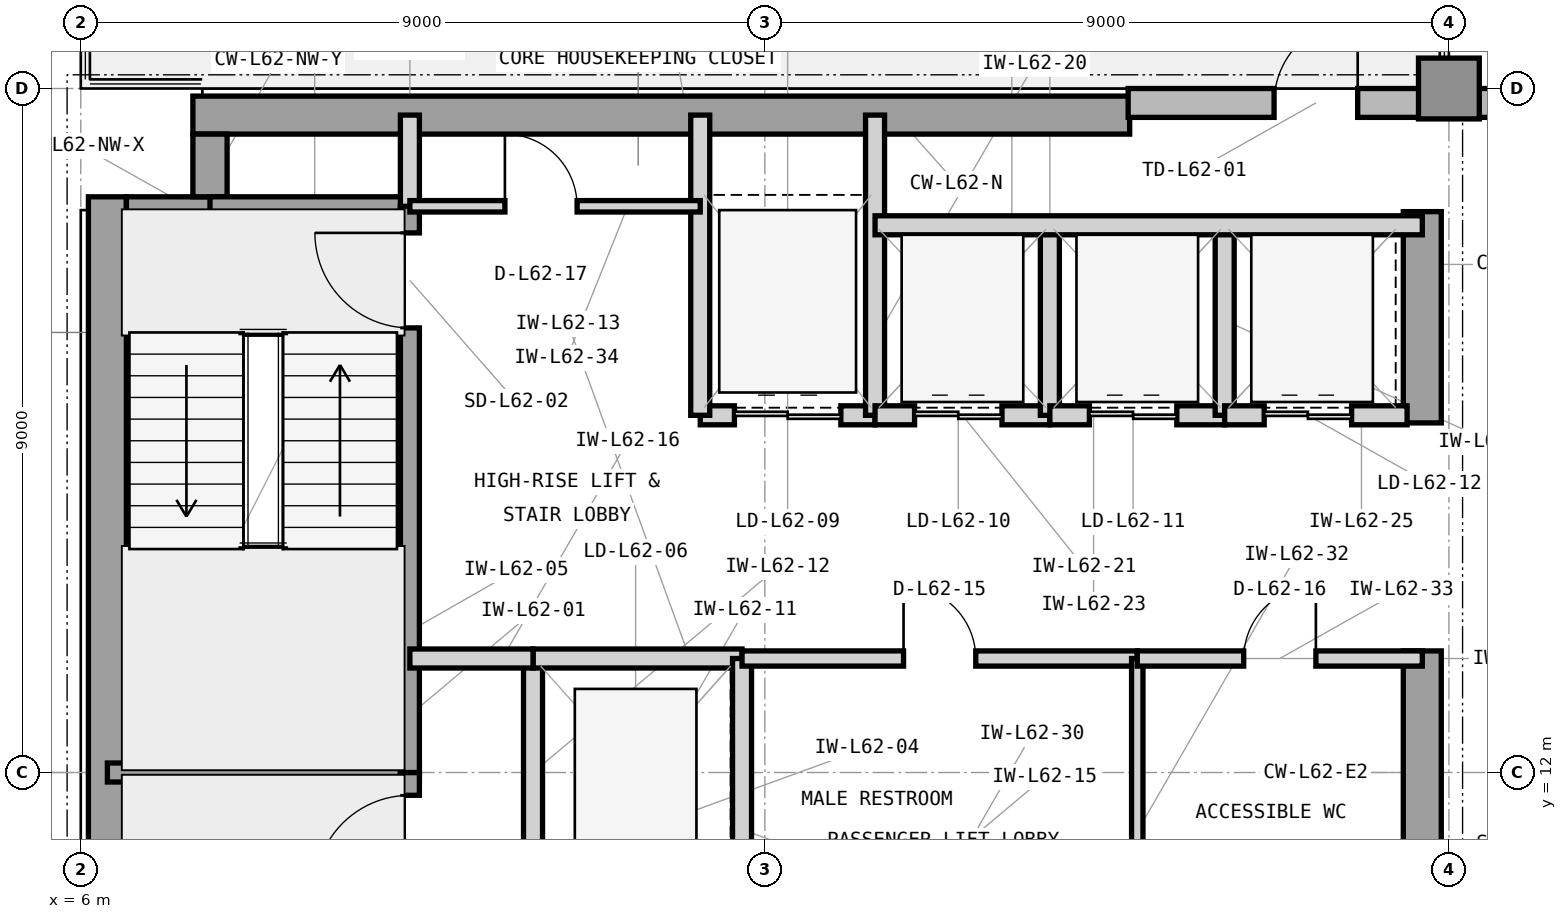
"""IFC4 building model, lengths in metres.
Left out: names, types, materials, properties, quantities, classifications, styles, units other than length and angle.
Written with IfcOpenShell. Run it as: python <this file> out.ifc"""

import sys

from ifc_helpers import new_model, si_unit, direction, frame, frame_2d, origin, origin_2d, place, context, subcontext, project, spatial, rectangle, extrude, element, fill, save


model = new_model("IFC4")
c1 = context("Model", 3, precision=1e-05, world=origin(), true_north=direction((0.0, 1.0)))
c2 = subcontext(c1, "Body", "Model", "MODEL_VIEW")
j1 = project(units=[si_unit("LENGTHUNIT", "METRE"), si_unit("PLANEANGLEUNIT", "RADIAN")], contexts=[c1])
p1 = place(None, origin())
s1 = spatial("IfcSite", under=j1, at=p1, CompositionType="ELEMENT")
p2 = place(p1, origin())
s2 = spatial("IfcBuilding", under=s1, at=p2, CompositionType="ELEMENT")
p3 = place(p2, frame((0.0, 0.0, 254.7)))
s3 = spatial("IfcBuildingStorey", under=s2, at=p3, CompositionType="ELEMENT", Elevation=254.7)
p4 = place(p3, frame((6.35, 4.425, 0.0), z_axis=(0.0, 0.0, 1.0), x_axis=(0.0, 1.0, 0.0)))
e1 = element("IfcWall", 1, at=p4, inside=s3, PredefinedType="SHEAR", context=c2, shape_type="SweptSolid", body=[
    extrude(rectangle(XDim=15.15, YDim=0.5, at=frame_2d((7.575, 0.0))), origin(), (0.0, 0.0, 1.0), 3.9),
])
p5 = place(p3, frame((7.475, 20.65, 0.0), z_axis=(0.0, 0.0, 1.0), x_axis=(1.0, 0.0, 0.0)))
e2 = element("IfcWall", 2, at=p5, inside=s3, PredefinedType="SHEAR", context=c2, shape_type="SweptSolid", body=[
    extrude(rectangle(XDim=12.325, YDim=0.5, at=frame_2d((6.163, 0.0))), origin(), (0.0, 0.0, 1.0), 3.9),
])
p6 = place(p3, frame((23.65, 10.4, 0.0), z_axis=(0.0, 0.0, 1.0), x_axis=(0.0, 1.0, 0.0)))
e3 = element("IfcWall", 3, at=p6, inside=s3, PredefinedType="SHEAR", context=c2, shape_type="SweptSolid", body=[
    extrude(rectangle(XDim=3.2, YDim=0.5, at=frame_2d((1.6, 0.0))), origin(), (0.0, 0.0, 1.0), 3.9),
])
p7 = place(p3, frame((23.65, 16.6, 0.0), z_axis=(0.0, 0.0, 1.0), x_axis=(0.0, 1.0, 0.0)))
e4 = element("IfcWall", 4, at=p7, inside=s3, PredefinedType="SHEAR", context=c2, shape_type="SweptSolid", body=[
    extrude(rectangle(XDim=2.78, YDim=0.5, at=frame_2d((1.39, 0.0))), origin(), (0.0, 0.0, 1.0), 3.9),
])
p8 = place(p3, frame((6.6, 19.35, 0.0), z_axis=(0.0, 0.0, 1.0), x_axis=(1.0, 0.0, 0.0)))
e5 = element("IfcWall", 5, at=p8, inside=s3, PredefinedType="SHEAR", context=c2, shape_type="SweptSolid", body=[
    extrude(rectangle(XDim=1.325, YDim=0.45, at=frame_2d((0.663, 0.0))), origin(), (0.0, 0.0, 1.0), 3.9),
])
p9 = place(p3, frame((7.7, 19.575, 0.0), z_axis=(0.0, 0.0, 1.0), x_axis=(0.0, 1.0, 0.0)))
e6 = element("IfcWall", 6, at=p9, inside=s3, PredefinedType="SHEAR", context=c2, shape_type="SweptSolid", body=[
    extrude(rectangle(XDim=0.825, YDim=0.45, at=frame_2d((0.413, 0.0))), origin(), (0.0, 0.0, 1.0), 3.9),
])
p10 = place(p3, frame((24.0, 21.0, 0.0), z_axis=(0.0, 0.0, 1.0), x_axis=(1.0, 0.0, 0.0)))
e7 = element("IfcColumn", 7, at=p10, inside=s3, PredefinedType="COLUMN", context=c2, shape_type="SweptSolid", body=[
    extrude(rectangle(XDim=0.8, YDim=0.8, at=origin_2d()), origin(), (0.0, 0.0, 1.0), 3.9),
])
p11 = place(p3, frame((52.4, 20.81, 0.0), z_axis=(0.0, 0.0, 1.0), x_axis=(-1.0, 0.0, 0.0)))
e8 = element("IfcWall", 8, at=p11, inside=s3, PredefinedType="STANDARD", context=c2, shape_type="SweptSolid", body=[
    extrude(rectangle(XDim=32.62, YDim=0.38, at=frame_2d((16.31, 0.0))), origin(), (0.0, 0.0, 1.0), 3.715),
])
p12 = place(p11, frame((29.6, 0.0, 0.0)))
e9 = element("IfcOpeningElement", 9, at=p12, cuts=e8, PredefinedType="OPENING", context=c2, shape_type="SweptSolid", body=[
    extrude(rectangle(XDim=1.1, YDim=2.3, at=frame_2d((0.55, 1.15))), frame((0.0, 0.2, 0.0), z_axis=(0.0, -1.0, 0.0), x_axis=(1.0, 0.0, 0.0)), (0.0, 0.0, 1.0), 0.4),
])
p13 = place(p11, frame((20.354, 0.0, 0.8)))
e10 = element("IfcOpeningElement", 10, at=p13, cuts=e8, PredefinedType="OPENING", context=c2, shape_type="SweptSolid", body=[
    extrude(rectangle(XDim=2.6, YDim=2.35, at=frame_2d((1.3, 1.175))), frame((0.0, 0.2, 0.0), z_axis=(0.0, -1.0, 0.0), x_axis=(1.0, 0.0, 0.0)), (0.0, 0.0, 1.0), 0.4),
])
p14 = place(p11, frame((12.154, 0.0, 0.8)))
e11 = element("IfcOpeningElement", 11, at=p14, cuts=e8, PredefinedType="OPENING", context=c2, shape_type="SweptSolid", body=[
    extrude(rectangle(XDim=2.6, YDim=2.35, at=frame_2d((1.3, 1.175))), frame((0.0, 0.2, 0.0), z_axis=(0.0, -1.0, 0.0), x_axis=(1.0, 0.0, 0.0)), (0.0, 0.0, 1.0), 0.4),
])
p15 = place(p11, frame((6.504, 0.0, 0.8)))
e12 = element("IfcOpeningElement", 12, at=p15, cuts=e8, PredefinedType="OPENING", context=c2, shape_type="SweptSolid", body=[
    extrude(rectangle(XDim=2.6, YDim=2.35, at=frame_2d((1.3, 1.175))), frame((0.0, 0.2, 0.0), z_axis=(0.0, -1.0, 0.0), x_axis=(1.0, 0.0, 0.0)), (0.0, 0.0, 1.0), 0.4),
])
p16 = place(p3, frame((6.35, 12.0, 0.0), z_axis=(0.0, 0.0, 1.0), x_axis=(1.0, 0.0, 0.0)))
e13 = element("IfcWall", 13, at=p16, inside=s3, PredefinedType="SHEAR", context=c2, shape_type="SweptSolid", body=[
    extrude(rectangle(XDim=4.105, YDim=0.25, at=frame_2d((2.052, 0.0))), origin(), (0.0, 0.0, 1.0), 3.9),
])
p17 = place(p3, frame((7.7, 19.45, 0.0), z_axis=(0.0, 0.0, 1.0), x_axis=(1.0, 0.0, 0.0)))
e14 = element("IfcWall", 14, at=p17, inside=s3, PredefinedType="SHEAR", context=c2, shape_type="SweptSolid", body=[
    extrude(rectangle(XDim=2.755, YDim=0.25, at=frame_2d((1.377, 0.0))), origin(), (0.0, 0.0, 1.0), 3.9),
])
p18 = place(p3, frame((10.33, 4.55, 0.0), z_axis=(0.0, 0.0, 1.0), x_axis=(0.0, 1.0, 0.0)))
e15 = element("IfcWall", 15, at=p18, inside=s3, PredefinedType="SHEAR", context=c2, shape_type="SweptSolid", body=[
    extrude(rectangle(XDim=7.45, YDim=0.25, at=frame_2d((3.725, 0.0))), origin(), (0.0, 0.0, 1.0), 3.9),
])
p19 = place(p18, frame((5.9, 0.0, 0.0)))
e16 = element("IfcOpeningElement", 16, at=p19, cuts=e15, PredefinedType="OPENING", context=c2, shape_type="SweptSolid", body=[
    extrude(rectangle(XDim=1.25, YDim=2.2, at=frame_2d((0.625, 1.1))), frame((0.0, 0.135, 0.0), z_axis=(0.0, -1.0, 0.0), x_axis=(1.0, 0.0, 0.0)), (0.0, 0.0, 1.0), 0.27),
])
p20 = place(p3, frame((10.33, 12.0, 0.0), z_axis=(0.0, 0.0, 1.0), x_axis=(0.0, 1.0, 0.0)))
e17 = element("IfcWall", 17, at=p20, inside=s3, PredefinedType="SHEAR", context=c2, shape_type="SweptSolid", body=[
    extrude(rectangle(XDim=7.45, YDim=0.25, at=frame_2d((3.725, 0.0))), origin(), (0.0, 0.0, 1.0), 3.9),
])
p21 = place(p20, frame((5.85, 0.0, 0.0)))
e18 = element("IfcOpeningElement", 18, at=p21, cuts=e17, PredefinedType="OPENING", context=c2, shape_type="SweptSolid", body=[
    extrude(rectangle(XDim=1.25, YDim=2.2, at=frame_2d((0.625, 1.1))), frame((0.0, 0.135, 0.0), z_axis=(0.0, -1.0, 0.0), x_axis=(1.0, 0.0, 0.0)), (0.0, 0.0, 1.0), 0.27),
])
p22 = place(p3, frame((10.33, 19.45, 0.0), z_axis=(0.0, 0.0, 1.0), x_axis=(0.0, 1.0, 0.0)))
e19 = element("IfcWall", 19, at=p22, inside=s3, PredefinedType="PARTITIONING", context=c2, shape_type="SweptSolid", body=[
    extrude(rectangle(XDim=1.2, YDim=0.25, at=frame_2d((0.6, 0.0))), origin(), (0.0, 0.0, 1.0), 3.705),
])
p23 = place(p3, frame((11.95, 10.5, 0.0), z_axis=(0.0, 0.0, 1.0), x_axis=(0.0, 1.0, 0.0)))
e20 = element("IfcWall", 20, at=p23, inside=s3, PredefinedType="PARTITIONING", context=c2, shape_type="SweptSolid", body=[
    extrude(rectangle(XDim=3.0, YDim=0.25, at=frame_2d((1.5, 0.0))), origin(), (0.0, 0.0, 1.0), 3.705),
])
p24 = place(p3, frame((11.95, 13.5, 0.0), z_axis=(0.0, 0.0, 1.0), x_axis=(1.0, 0.0, 0.0)))
e21 = element("IfcWall", 21, at=p24, inside=s3, PredefinedType="PARTITIONING", context=c2, shape_type="SweptSolid", body=[
    extrude(rectangle(XDim=2.75, YDim=0.25, at=frame_2d((1.375, 0.0))), origin(), (0.0, 0.0, 1.0), 3.088),
])
p25 = place(p3, frame((14.7, 10.5, 0.0), z_axis=(0.0, 0.0, 1.0), x_axis=(0.0, 1.0, 0.0)))
e22 = element("IfcWall", 22, at=p25, inside=s3, PredefinedType="PARTITIONING", context=c2, shape_type="SweptSolid", body=[
    extrude(rectangle(XDim=3.0, YDim=0.25, at=frame_2d((1.5, 0.0))), origin(), (0.0, 0.0, 1.0), 3.705),
])
p26 = place(p3, frame((10.33, 13.5, 0.0), z_axis=(0.0, 0.0, 1.0), x_axis=(1.0, 0.0, 0.0)))
e23 = element("IfcWall", 23, at=p26, inside=s3, PredefinedType="PARTITIONING", context=c2, shape_type="SweptSolid", body=[
    extrude(rectangle(XDim=1.62, YDim=0.25, at=frame_2d((0.81, 0.0))), origin(), (0.0, 0.0, 1.0), 3.088),
])
p27 = place(p3, frame((14.15, 16.7, 0.0), z_axis=(0.0, 0.0, 1.0), x_axis=(1.0, 0.0, 0.0)))
e24 = element("IfcWall", 24, at=p27, inside=s3, PredefinedType="PARTITIONING", context=c2, shape_type="SweptSolid", body=[
    extrude(rectangle(XDim=2.3, YDim=0.25, at=frame_2d((1.15, 0.0))), origin(), (0.0, 0.0, 1.0), 3.088),
])
p28 = place(p27, frame((0.45, 0.0, 0.0)))
e25 = element("IfcOpeningElement", 25, at=p28, cuts=e24, PredefinedType="OPENING", context=c2, shape_type="SweptSolid", body=[
    extrude(rectangle(XDim=1.4, YDim=2.35, at=frame_2d((0.7, 1.175))), frame((0.0, 0.135, 0.0), z_axis=(0.0, -1.0, 0.0), x_axis=(1.0, 0.0, 0.0)), (0.0, 0.0, 1.0), 0.27),
])
for number, where, z_axis, x_axis in (
    (26, (14.15, 16.7, 0.0), (0.0, 0.0, 1.0), (0.0, 1.0, 0.0)),
    (27, (16.45, 16.7, 0.0), (0.0, 0.0, 1.0), (0.0, 1.0, 0.0)),
):
    element("IfcWall", number, at=place(p3, frame(where, z_axis=z_axis, x_axis=x_axis)), inside=s3, PredefinedType="PARTITIONING", context=c2, shape_type="SweptSolid", body=[
        extrude(rectangle(XDim=3.95, YDim=0.25, at=frame_2d((1.975, 0.0))), origin(), (0.0, 0.0, 1.0), 3.705),
    ])
p29 = place(p3, frame((16.45, 16.7, 0.0), z_axis=(0.0, 0.0, 1.0), x_axis=(1.0, 0.0, 0.0)))
e28 = element("IfcWall", 28, at=p29, inside=s3, PredefinedType="PARTITIONING", context=c2, shape_type="SweptSolid", body=[
    extrude(rectangle(XDim=2.3, YDim=0.25, at=frame_2d((1.15, 0.0))), origin(), (0.0, 0.0, 1.0), 3.088),
])
p30 = place(p29, frame((0.52, 0.0, 0.0)))
e29 = element("IfcOpeningElement", 29, at=p30, cuts=e28, PredefinedType="OPENING", context=c2, shape_type="SweptSolid", body=[
    extrude(rectangle(XDim=1.15, YDim=2.25, at=frame_2d((0.575, 1.125))), frame((0.0, 0.135, 0.0), z_axis=(0.0, -1.0, 0.0), x_axis=(1.0, 0.0, 0.0)), (0.0, 0.0, 1.0), 0.27),
])
p31 = place(p3, frame((18.75, 16.7, 0.0), z_axis=(0.0, 0.0, 1.0), x_axis=(0.0, 1.0, 0.0)))
e30 = element("IfcWall", 30, at=p31, inside=s3, PredefinedType="PARTITIONING", context=c2, shape_type="SweptSolid", body=[
    extrude(rectangle(XDim=2.5, YDim=0.25, at=frame_2d((1.25, 0.0))), origin(), (0.0, 0.0, 1.0), 3.705),
])
p32 = place(p3, frame((18.75, 16.7, 0.0), z_axis=(0.0, 0.0, 1.0), x_axis=(1.0, 0.0, 0.0)))
e31 = element("IfcWall", 31, at=p32, inside=s3, PredefinedType="PARTITIONING", context=c2, shape_type="SweptSolid", body=[
    extrude(rectangle(XDim=2.3, YDim=0.25, at=frame_2d((1.15, 0.0))), origin(), (0.0, 0.0, 1.0), 3.088),
])
p33 = place(p32, frame((0.52, 0.0, 0.0)))
e32 = element("IfcOpeningElement", 32, at=p33, cuts=e31, PredefinedType="OPENING", context=c2, shape_type="SweptSolid", body=[
    extrude(rectangle(XDim=1.15, YDim=2.25, at=frame_2d((0.575, 1.125))), frame((0.0, 0.135, 0.0), z_axis=(0.0, -1.0, 0.0), x_axis=(1.0, 0.0, 0.0)), (0.0, 0.0, 1.0), 0.27),
])
p34 = place(p3, frame((21.05, 16.7, 0.0), z_axis=(0.0, 0.0, 1.0), x_axis=(0.0, 1.0, 0.0)))
e33 = element("IfcWall", 33, at=p34, inside=s3, PredefinedType="PARTITIONING", context=c2, shape_type="SweptSolid", body=[
    extrude(rectangle(XDim=2.5, YDim=0.25, at=frame_2d((1.25, 0.0))), origin(), (0.0, 0.0, 1.0), 3.705),
])
p35 = place(p3, frame((21.05, 16.7, 0.0), z_axis=(0.0, 0.0, 1.0), x_axis=(1.0, 0.0, 0.0)))
e34 = element("IfcWall", 34, at=p35, inside=s3, PredefinedType="PARTITIONING", context=c2, shape_type="SweptSolid", body=[
    extrude(rectangle(XDim=2.4, YDim=0.25, at=frame_2d((1.2, 0.0))), origin(), (0.0, 0.0, 1.0), 3.088),
])
p36 = place(p35, frame((0.52, 0.0, 0.0)))
e35 = element("IfcOpeningElement", 35, at=p36, cuts=e34, PredefinedType="OPENING", context=c2, shape_type="SweptSolid", body=[
    extrude(rectangle(XDim=1.15, YDim=2.25, at=frame_2d((0.575, 1.125))), frame((0.0, 0.135, 0.0), z_axis=(0.0, -1.0, 0.0), x_axis=(1.0, 0.0, 0.0)), (0.0, 0.0, 1.0), 0.27),
])
p37 = place(p3, frame((16.45, 19.2, 0.0), z_axis=(0.0, 0.0, 1.0), x_axis=(1.0, 0.0, 0.0)))
e36 = element("IfcWall", 36, at=p37, inside=s3, PredefinedType="PARTITIONING", context=c2, shape_type="SweptSolid", body=[
    extrude(rectangle(XDim=7.2, YDim=0.25, at=frame_2d((3.6, 0.0))), origin(), (0.0, 0.0, 1.0), 3.705),
])
p38 = place(p3, frame((14.7, 13.5, 0.0), z_axis=(0.0, 0.0, 1.0), x_axis=(1.0, 0.0, 0.0)))
e37 = element("IfcWall", 37, at=p38, inside=s3, PredefinedType="PARTITIONING", context=c2, shape_type="SweptSolid", body=[
    extrude(rectangle(XDim=5.2, YDim=0.2, at=frame_2d((2.6, 0.0))), origin(), (0.0, 0.0, 1.0), 3.088),
])
p39 = place(p38, frame((2.125, 0.0, 0.0)))
e38 = element("IfcOpeningElement", 38, at=p39, cuts=e37, PredefinedType="OPENING", context=c2, shape_type="SweptSolid", body=[
    extrude(rectangle(XDim=0.95, YDim=2.1, at=frame_2d((0.475, 1.05))), frame((0.0, 0.11, 0.0), z_axis=(0.0, -1.0, 0.0), x_axis=(1.0, 0.0, 0.0)), (0.0, 0.0, 1.0), 0.22),
])
p40 = place(p3, frame((19.9, 10.465, 0.0), z_axis=(0.0, 0.0, 1.0), x_axis=(0.0, 1.0, 0.0)))
e39 = element("IfcWall", 39, at=p40, inside=s3, PredefinedType="PARTITIONING", context=c2, shape_type="SweptSolid", body=[
    extrude(rectangle(XDim=3.035, YDim=0.15, at=frame_2d((1.518, 0.0))), origin(), (0.0, 0.0, 1.0), 3.705),
])
p41 = place(p3, frame((19.9, 13.5, 0.0), z_axis=(0.0, 0.0, 1.0), x_axis=(1.0, 0.0, 0.0)))
e40 = element("IfcWall", 40, at=p41, inside=s3, PredefinedType="PARTITIONING", context=c2, shape_type="SweptSolid", body=[
    extrude(rectangle(XDim=3.75, YDim=0.2, at=frame_2d((1.875, 0.0))), origin(), (0.0, 0.0, 1.0), 3.088),
])
p42 = place(p41, frame((1.4, 0.0, 0.0)))
e41 = element("IfcOpeningElement", 41, at=p42, cuts=e40, PredefinedType="OPENING", context=c2, shape_type="SweptSolid", body=[
    extrude(rectangle(XDim=0.95, YDim=2.1, at=frame_2d((0.475, 1.05))), frame((0.0, 0.11, 0.0), z_axis=(0.0, -1.0, 0.0), x_axis=(1.0, 0.0, 0.0)), (0.0, 0.0, 1.0), 0.22),
])
p43 = place(p3, frame((10.33, 19.45, 0.0), z_axis=(0.0, 0.0, 1.0), x_axis=(1.0, 0.0, 0.0)))
e42 = element("IfcWall", 42, at=p43, inside=s3, PredefinedType="PARTITIONING", context=c2, shape_type="SweptSolid", body=[
    extrude(rectangle(XDim=3.82, YDim=0.15, at=frame_2d((1.91, 0.0))), origin(), (0.0, 0.0, 1.0), 3.705),
])
p44 = place(p43, frame((1.25, 0.0, 0.0)))
e43 = element("IfcOpeningElement", 43, at=p44, cuts=e42, PredefinedType="OPENING", context=c2, shape_type="SweptSolid", body=[
    extrude(rectangle(XDim=0.95, YDim=2.1, at=frame_2d((0.475, 1.05))), frame((0.0, 0.085, 0.0), z_axis=(0.0, -1.0, 0.0), x_axis=(1.0, 0.0, 0.0)), (0.0, 0.0, 1.0), 0.17),
])
p45 = place(p12, frame((1.1, 0.0, 0.0), z_axis=(0.0, 0.0, 1.0), x_axis=(-1.0, 0.0, 0.0)))
e44 = element("IfcDoor", 44, at=p45, inside=s3, OperationType="SINGLE_SWING_RIGHT", PredefinedType="DOOR", context=c2, shape_type="SweptSolid", body=[
    extrude(rectangle(XDim=1.1, YDim=2.3, at=frame_2d((0.55, 1.15))), frame((0.0, 0.025, 0.0), z_axis=(0.0, -1.0, 0.0), x_axis=(1.0, 0.0, 0.0)), (0.0, 0.0, 1.0), 0.05),
])
fill(e9, e44)
p46 = place(p19, origin())
e45 = element("IfcDoor", 45, at=p46, inside=s3, OperationType="SINGLE_SWING_LEFT", PredefinedType="DOOR", context=c2, shape_type="SweptSolid", body=[
    extrude(rectangle(XDim=1.25, YDim=2.2, at=frame_2d((0.625, 1.1))), frame((0.0, 0.025, 0.0), z_axis=(0.0, -1.0, 0.0), x_axis=(1.0, 0.0, 0.0)), (0.0, 0.0, 1.0), 0.05),
])
fill(e16, e45)
p47 = place(p21, origin())
e46 = element("IfcDoor", 46, at=p47, inside=s3, OperationType="SINGLE_SWING_RIGHT", PredefinedType="DOOR", context=c2, shape_type="SweptSolid", body=[
    extrude(rectangle(XDim=1.25, YDim=2.2, at=frame_2d((0.625, 1.1))), frame((0.0, 0.025, 0.0), z_axis=(0.0, -1.0, 0.0), x_axis=(1.0, 0.0, 0.0)), (0.0, 0.0, 1.0), 0.05),
])
fill(e18, e46)
p48 = place(p28, origin())
e47 = element("IfcDoor", 47, at=p48, inside=s3, OperationType="DOUBLE_DOOR_SLIDING", PredefinedType="DOOR", context=c2, shape_type="SweptSolid", body=[
    extrude(rectangle(XDim=1.4, YDim=2.35, at=frame_2d((0.7, 1.175))), frame((0.0, 0.025, 0.0), z_axis=(0.0, -1.0, 0.0), x_axis=(1.0, 0.0, 0.0)), (0.0, 0.0, 1.0), 0.05),
])
fill(e25, e47)
p49 = place(p30, origin())
e48 = element("IfcDoor", 48, at=p49, inside=s3, OperationType="DOUBLE_DOOR_SLIDING", PredefinedType="DOOR", context=c2, shape_type="SweptSolid", body=[
    extrude(rectangle(XDim=1.15, YDim=2.25, at=frame_2d((0.575, 1.125))), frame((0.0, 0.025, 0.0), z_axis=(0.0, -1.0, 0.0), x_axis=(1.0, 0.0, 0.0)), (0.0, 0.0, 1.0), 0.05),
])
fill(e29, e48)
p50 = place(p33, origin())
e49 = element("IfcDoor", 49, at=p50, inside=s3, OperationType="DOUBLE_DOOR_SLIDING", PredefinedType="DOOR", context=c2, shape_type="SweptSolid", body=[
    extrude(rectangle(XDim=1.15, YDim=2.25, at=frame_2d((0.575, 1.125))), frame((0.0, 0.025, 0.0), z_axis=(0.0, -1.0, 0.0), x_axis=(1.0, 0.0, 0.0)), (0.0, 0.0, 1.0), 0.05),
])
fill(e32, e49)
p51 = place(p36, origin())
e50 = element("IfcDoor", 50, at=p51, inside=s3, OperationType="DOUBLE_DOOR_SLIDING", PredefinedType="DOOR", context=c2, shape_type="SweptSolid", body=[
    extrude(rectangle(XDim=1.15, YDim=2.25, at=frame_2d((0.575, 1.125))), frame((0.0, 0.025, 0.0), z_axis=(0.0, -1.0, 0.0), x_axis=(1.0, 0.0, 0.0)), (0.0, 0.0, 1.0), 0.05),
])
fill(e35, e50)
p52 = place(p39, origin())
e51 = element("IfcDoor", 51, at=p52, inside=s3, OperationType="SINGLE_SWING_LEFT", PredefinedType="DOOR", context=c2, shape_type="SweptSolid", body=[
    extrude(rectangle(XDim=0.95, YDim=2.1, at=frame_2d((0.475, 1.05))), frame((0.0, 0.025, 0.0), z_axis=(0.0, -1.0, 0.0), x_axis=(1.0, 0.0, 0.0)), (0.0, 0.0, 1.0), 0.05),
])
fill(e38, e51)
p53 = place(p42, origin())
e52 = element("IfcDoor", 52, at=p53, inside=s3, OperationType="SINGLE_SWING_RIGHT", PredefinedType="DOOR", context=c2, shape_type="SweptSolid", body=[
    extrude(rectangle(XDim=0.95, YDim=2.1, at=frame_2d((0.475, 1.05))), frame((0.0, 0.025, 0.0), z_axis=(0.0, -1.0, 0.0), x_axis=(1.0, 0.0, 0.0)), (0.0, 0.0, 1.0), 0.05),
])
fill(e41, e52)
p54 = place(p44, origin())
e53 = element("IfcDoor", 53, at=p54, inside=s3, OperationType="SINGLE_SWING_LEFT", PredefinedType="DOOR", context=c2, shape_type="SweptSolid", body=[
    extrude(rectangle(XDim=0.95, YDim=2.1, at=frame_2d((0.475, 1.05))), frame((0.0, 0.025, 0.0), z_axis=(0.0, -1.0, 0.0), x_axis=(1.0, 0.0, 0.0)), (0.0, 0.0, 1.0), 0.05),
])
fill(e43, e53)
save(model, sys.argv[1])
